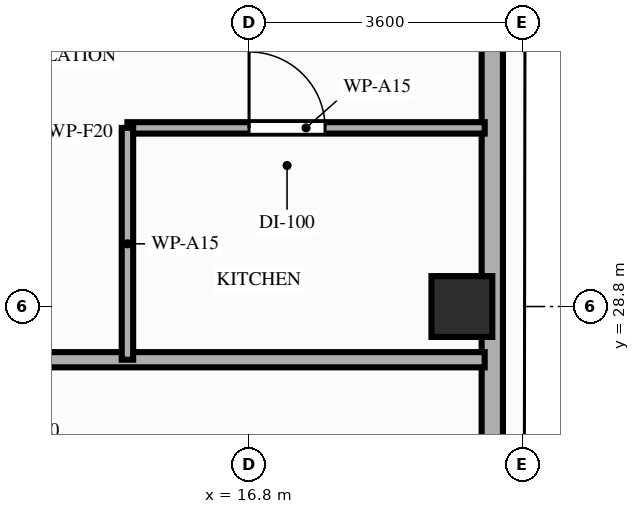
"""IFC4 building model, lengths in metres.
Left out: names, types, materials, properties, quantities, classifications, styles, units other than length and angle.
Written with IfcOpenShell. Run it as: python <this file> out.ifc"""

import sys

from ifc_helpers import new_model, si_unit, direction, frame, frame_2d, origin, origin_2d, place, context, subcontext, project, spatial, rectangle, extrude, element, fill, save


model = new_model("IFC4")
c1 = context("Model", 3, precision=1e-05, world=origin(), true_north=direction((0.0, 1.0)))
c2 = subcontext(c1, "Body", "Model", "MODEL_VIEW")
j1 = project(units=[si_unit("LENGTHUNIT", "METRE"), si_unit("PLANEANGLEUNIT", "RADIAN")], contexts=[c1])
p1 = place(None, origin())
s1 = spatial("IfcSite", under=j1, at=p1, CompositionType="ELEMENT")
p2 = place(p1, origin())
s2 = spatial("IfcBuilding", under=s1, at=p2, CompositionType="ELEMENT")
p3 = place(p2, frame((0.0, 0.0, 237.6)))
s3 = spatial("IfcBuildingStorey", under=s2, at=p3, CompositionType="ELEMENT", Elevation=237.6)
p4 = place(p3, frame((19.6, 28.8, 0.0), z_axis=(0.0, 0.0, 1.0), x_axis=(1.0, 0.0, 0.0)))
e1 = element("IfcColumn", 1, at=p4, inside=s3, PredefinedType="COLUMN", context=c2, shape_type="SweptSolid", body=[
    extrude(rectangle(XDim=0.8, YDim=0.8, at=origin_2d()), origin(), (0.0, 0.0, 1.0), 3.2),
])
p5 = place(p3, frame((20.0, 10.8, 0.0), z_axis=(0.0, 0.0, 1.0), x_axis=(0.0, 1.0, 0.0)))
e2 = element("IfcWall", 2, at=p5, inside=s3, PredefinedType="STANDARD", context=c2, shape_type="SweptSolid", body=[
    extrude(rectangle(XDim=21.55, YDim=0.28, at=frame_2d((10.775, 0.0))), origin(), (0.0, 0.0, 1.0), 2.56),
])
p6 = place(p5, frame((3.08, 0.0, 0.85)))
e3 = element("IfcOpeningElement", 3, at=p6, cuts=e2, PredefinedType="OPENING", context=c2, shape_type="SweptSolid", body=[
    extrude(rectangle(XDim=2.6, YDim=1.46, at=frame_2d((1.3, 0.73))), frame((0.0, 0.15, 0.0), z_axis=(0.0, -1.0, 0.0), x_axis=(1.0, 0.0, 0.0)), (0.0, 0.0, 1.0), 0.3),
])
p7 = place(p5, frame((8.6, 0.0, 0.85)))
e4 = element("IfcOpeningElement", 4, at=p7, cuts=e2, PredefinedType="OPENING", context=c2, shape_type="SweptSolid", body=[
    extrude(rectangle(XDim=2.6, YDim=1.46, at=frame_2d((1.3, 0.73))), frame((0.0, 0.15, 0.0), z_axis=(0.0, -1.0, 0.0), x_axis=(1.0, 0.0, 0.0)), (0.0, 0.0, 1.0), 0.3),
])
p8 = place(p3, frame((13.48, 28.1, 0.0), z_axis=(0.0, 0.0, 1.0), x_axis=(1.0, 0.0, 0.0)))
e5 = element("IfcWall", 5, at=p8, inside=s3, PredefinedType="PARTITIONING", context=c2, shape_type="SweptSolid", body=[
    extrude(rectangle(XDim=6.42, YDim=0.2, at=frame_2d((3.21, 0.0))), origin(), (0.0, 0.0, 1.0), 2.56),
])
p9 = place(p3, frame((15.2, 31.15, 0.0), z_axis=(0.0, 0.0, 1.0), x_axis=(1.0, 0.0, 0.0)))
e6 = element("IfcWall", 6, at=p9, inside=s3, PredefinedType="PARTITIONING", context=c2, shape_type="SweptSolid", body=[
    extrude(rectangle(XDim=4.7, YDim=0.15, at=frame_2d((2.35, 0.0))), origin(), (0.0, 0.0, 1.0), 2.56),
])
p10 = place(p9, frame((1.6, 0.0, 0.0)))
e7 = element("IfcOpeningElement", 7, at=p10, cuts=e6, PredefinedType="OPENING", context=c2, shape_type="SweptSolid", body=[
    extrude(rectangle(XDim=1.0, YDim=2.15, at=frame_2d((0.5, 1.075))), frame((0.0, 0.085, 0.0), z_axis=(0.0, -1.0, 0.0), x_axis=(1.0, 0.0, 0.0)), (0.0, 0.0, 1.0), 0.17),
])
p11 = place(p3, frame((15.2, 28.1, 0.0), z_axis=(0.0, 0.0, 1.0), x_axis=(0.0, 1.0, 0.0)))
e8 = element("IfcWall", 8, at=p11, inside=s3, PredefinedType="PARTITIONING", context=c2, shape_type="SweptSolid", body=[
    extrude(rectangle(XDim=3.05, YDim=0.15, at=frame_2d((1.525, 0.0))), origin(), (0.0, 0.0, 1.0), 2.56),
])
p12 = place(p10, origin())
e9 = element("IfcDoor", 9, at=p12, inside=s3, OperationType="SINGLE_SWING_LEFT", PredefinedType="DOOR", context=c2, shape_type="SweptSolid", body=[
    extrude(rectangle(XDim=1.0, YDim=2.15, at=frame_2d((0.5, 1.075))), frame((0.0, 0.025, 0.0), z_axis=(0.0, -1.0, 0.0), x_axis=(1.0, 0.0, 0.0)), (0.0, 0.0, 1.0), 0.05),
])
fill(e7, e9)
save(model, sys.argv[1])
